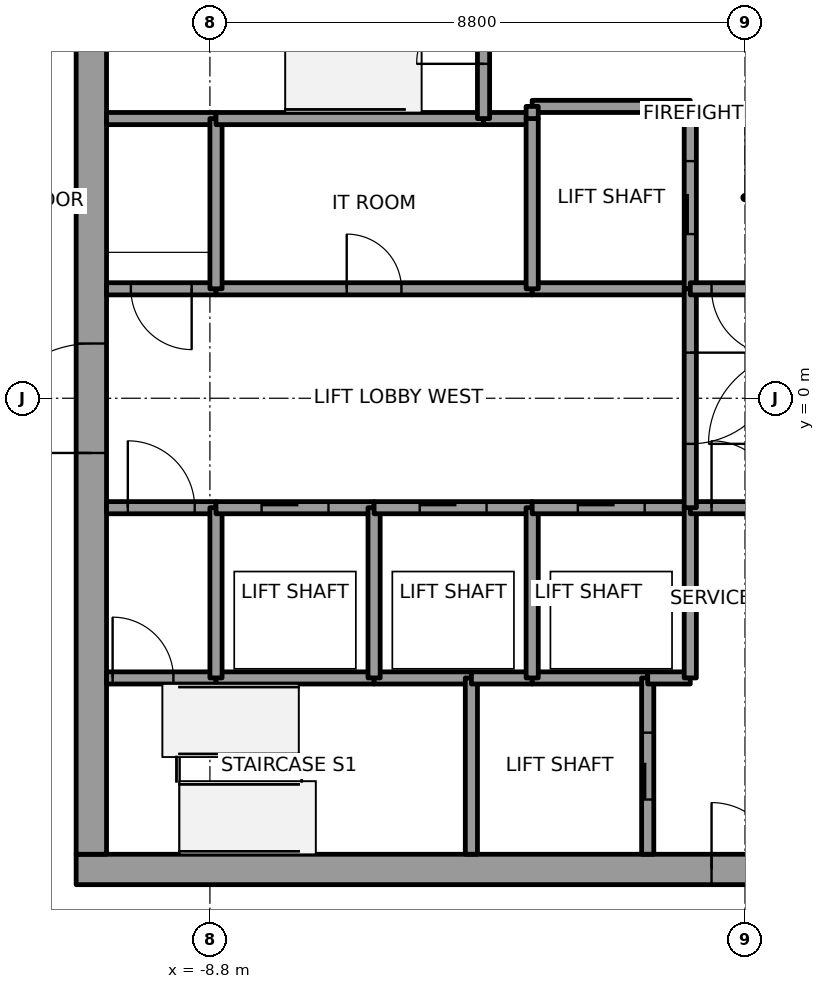
"""IFC4 building model, lengths in metres.
Left out: names, types, materials, properties, quantities, classifications, styles, units other than length and angle.
Written with IfcOpenShell. Run it as: python <this file> out.ifc"""

import sys

from ifc_helpers import new_model, si_unit, direction, frame, frame_2d, origin, place, context, subcontext, project, spatial, rectangle, extrude, element, fill, save


model = new_model("IFC4")
c1 = context("Model", 3, precision=1e-05, world=origin(), true_north=direction((0.0, 1.0)))
c2 = subcontext(c1, "Body", "Model", "MODEL_VIEW")
j1 = project(units=[si_unit("LENGTHUNIT", "METRE"), si_unit("PLANEANGLEUNIT", "RADIAN")], contexts=[c1])
p1 = place(None, origin())
s1 = spatial("IfcSite", under=j1, at=p1, CompositionType="ELEMENT")
p2 = place(p1, origin())
s2 = spatial("IfcBuilding", under=s1, at=p2, CompositionType="ELEMENT")
p3 = place(p2, frame((0.0, 0.0, 319.0)))
s3 = spatial("IfcBuildingStorey", under=s2, at=p3, CompositionType="ELEMENT", Elevation=319.0)
p4 = place(p3, frame((-11.0, -7.75, 0.0), z_axis=(0.0, 0.0, 1.0), x_axis=(1.0, 0.0, 0.0)))
e1 = element("IfcWall", 1, at=p4, inside=s3, PredefinedType="SHEAR", context=c2, shape_type="SweptSolid", body=[
    extrude(rectangle(XDim=22.0, YDim=0.5, at=frame_2d((11.0, 0.0))), origin(), (0.0, 0.0, 1.0), 5.4),
])
p5 = place(p4, frame((10.45, 0.0, 0.0)))
e2 = element("IfcOpeningElement", 2, at=p5, cuts=e1, PredefinedType="OPENING", context=c2, shape_type="SweptSolid", body=[
    extrude(rectangle(XDim=1.1, YDim=2.1, at=frame_2d((0.55, 1.05))), frame((0.0, 0.25, 0.0), z_axis=(0.0, -1.0, 0.0), x_axis=(1.0, 0.0, 0.0)), (0.0, 0.0, 1.0), 0.5),
])
p6 = place(p3, frame((-10.75, -7.5, 0.0), z_axis=(0.0, 0.0, 1.0), x_axis=(0.0, 1.0, 0.0)))
e3 = element("IfcWall", 3, at=p6, inside=s3, PredefinedType="SHEAR", context=c2, shape_type="SweptSolid", body=[
    extrude(rectangle(XDim=15.0, YDim=0.5, at=frame_2d((7.5, 0.0))), origin(), (0.0, 0.0, 1.0), 5.4),
])
p7 = place(p6, frame((6.6, 0.0, 0.0)))
e4 = element("IfcOpeningElement", 4, at=p7, cuts=e3, PredefinedType="OPENING", context=c2, shape_type="SweptSolid", body=[
    extrude(rectangle(XDim=1.8, YDim=2.1, at=frame_2d((0.9, 1.05))), frame((0.0, 0.25, 0.0), z_axis=(0.0, -1.0, 0.0), x_axis=(1.0, 0.0, 0.0)), (0.0, 0.0, 1.0), 0.5),
])
p8 = place(p3, frame((-10.5, -4.6, 0.0), z_axis=(0.0, 0.0, 1.0), x_axis=(1.0, 0.0, 0.0)))
e5 = element("IfcWall", 5, at=p8, inside=s3, PredefinedType="SOLIDWALL", context=c2, shape_type="SweptSolid", body=[
    extrude(rectangle(XDim=1.8, YDim=0.2, at=frame_2d((0.9, 0.0))), origin(), (0.0, 0.0, 1.0), 5.25),
])
p9 = place(p8, frame((0.1, 0.0, 0.0)))
e6 = element("IfcOpeningElement", 6, at=p9, cuts=e5, PredefinedType="OPENING", context=c2, shape_type="SweptSolid", body=[
    extrude(rectangle(XDim=1.0, YDim=2.1, at=frame_2d((0.5, 1.05))), frame((0.0, 0.1, 0.0), z_axis=(0.0, -1.0, 0.0), x_axis=(1.0, 0.0, 0.0)), (0.0, 0.0, 1.0), 0.2),
])
p10 = place(p3, frame((-10.5, -1.8, 0.0), z_axis=(0.0, 0.0, 1.0), x_axis=(1.0, 0.0, 0.0)))
e7 = element("IfcWall", 7, at=p10, inside=s3, PredefinedType="SOLIDWALL", context=c2, shape_type="SweptSolid", body=[
    extrude(rectangle(XDim=1.8, YDim=0.2, at=frame_2d((0.9, 0.0))), origin(), (0.0, 0.0, 1.0), 5.25),
])
p11 = place(p10, frame((0.35, 0.0, 0.0)))
e8 = element("IfcOpeningElement", 8, at=p11, cuts=e7, PredefinedType="OPENING", context=c2, shape_type="SweptSolid", body=[
    extrude(rectangle(XDim=1.1, YDim=2.1, at=frame_2d((0.55, 1.05))), frame((0.0, 0.1, 0.0), z_axis=(0.0, -1.0, 0.0), x_axis=(1.0, 0.0, 0.0)), (0.0, 0.0, 1.0), 0.2),
])
p12 = place(p3, frame((-8.7, 1.8, 0.0), z_axis=(0.0, 0.0, 1.0), x_axis=(-1.0, 0.0, 0.0)))
e9 = element("IfcWall", 9, at=p12, inside=s3, PredefinedType="SOLIDWALL", context=c2, shape_type="SweptSolid", body=[
    extrude(rectangle(XDim=1.8, YDim=0.2, at=frame_2d((0.9, 0.0))), origin(), (0.0, 0.0, 1.0), 5.25),
])
p13 = place(p12, frame((0.4, 0.0, 0.0)))
e10 = element("IfcOpeningElement", 10, at=p13, cuts=e9, PredefinedType="OPENING", context=c2, shape_type="SweptSolid", body=[
    extrude(rectangle(XDim=1.0, YDim=2.1, at=frame_2d((0.5, 1.05))), frame((0.0, 0.1, 0.0), z_axis=(0.0, -1.0, 0.0), x_axis=(1.0, 0.0, 0.0)), (0.0, 0.0, 1.0), 0.2),
])
p14 = place(p3, frame((-8.7, 4.6, 0.0), z_axis=(0.0, 0.0, 1.0), x_axis=(-1.0, 0.0, 0.0)))
e11 = element("IfcWall", 11, at=p14, inside=s3, PredefinedType="SOLIDWALL", context=c2, shape_type="SweptSolid", body=[
    extrude(rectangle(XDim=1.8, YDim=0.2, at=frame_2d((0.9, 0.0))), origin(), (0.0, 0.0, 1.0), 5.25),
])
p15 = place(p3, frame((-8.7, -4.6, 0.0), z_axis=(0.0, 0.0, 1.0), x_axis=(1.0, 0.0, 0.0)))
e12 = element("IfcWall", 12, at=p15, inside=s3, PredefinedType="SOLIDWALL", context=c2, shape_type="SweptSolid", body=[
    extrude(rectangle(XDim=2.6, YDim=0.2, at=frame_2d((1.3, 0.0))), origin(), (0.0, 0.0, 1.0), 5.25),
])
p16 = place(p3, frame((-8.7, -4.6, 0.0), z_axis=(0.0, 0.0, 1.0), x_axis=(0.0, 1.0, 0.0)))
e13 = element("IfcWall", 13, at=p16, inside=s3, PredefinedType="SOLIDWALL", context=c2, shape_type="SweptSolid", body=[
    extrude(rectangle(XDim=2.8, YDim=0.2, at=frame_2d((1.4, 0.0))), origin(), (0.0, 0.0, 1.0), 5.25),
])
p17 = place(p3, frame((-8.7, -1.8, 0.0), z_axis=(0.0, 0.0, 1.0), x_axis=(1.0, 0.0, 0.0)))
e14 = element("IfcWall", 14, at=p17, inside=s3, PredefinedType="SOLIDWALL", context=c2, shape_type="SweptSolid", body=[
    extrude(rectangle(XDim=2.6, YDim=0.2, at=frame_2d((1.3, 0.0))), origin(), (0.0, 0.0, 1.0), 5.25),
])
p18 = place(p17, frame((0.75, 0.0, 0.0)))
e15 = element("IfcOpeningElement", 15, at=p18, cuts=e14, PredefinedType="OPENING", context=c2, shape_type="SweptSolid", body=[
    extrude(rectangle(XDim=1.1, YDim=2.1, at=frame_2d((0.55, 1.05))), frame((0.0, 0.1, 0.0), z_axis=(0.0, -1.0, 0.0), x_axis=(1.0, 0.0, 0.0)), (0.0, 0.0, 1.0), 0.2),
])
p19 = place(p3, frame((-8.7, 1.8, 0.0), z_axis=(0.0, 0.0, 1.0), x_axis=(1.0, 0.0, 0.0)))
e16 = element("IfcWall", 16, at=p19, inside=s3, PredefinedType="SOLIDWALL", context=c2, shape_type="SweptSolid", body=[
    extrude(rectangle(XDim=5.2, YDim=0.2, at=frame_2d((2.6, 0.0))), origin(), (0.0, 0.0, 1.0), 5.25),
])
p20 = place(p19, frame((2.15, 0.0, 0.0)))
e17 = element("IfcOpeningElement", 17, at=p20, cuts=e16, PredefinedType="OPENING", context=c2, shape_type="SweptSolid", body=[
    extrude(rectangle(XDim=0.9, YDim=2.1, at=frame_2d((0.45, 1.05))), frame((0.0, 0.1, 0.0), z_axis=(0.0, -1.0, 0.0), x_axis=(1.0, 0.0, 0.0)), (0.0, 0.0, 1.0), 0.2),
])
p21 = place(p3, frame((-8.7, 4.6, 0.0), z_axis=(0.0, 0.0, 1.0), x_axis=(0.0, -1.0, 0.0)))
e18 = element("IfcWall", 18, at=p21, inside=s3, PredefinedType="SOLIDWALL", context=c2, shape_type="SweptSolid", body=[
    extrude(rectangle(XDim=2.8, YDim=0.2, at=frame_2d((1.4, 0.0))), origin(), (0.0, 0.0, 1.0), 5.25),
])
p22 = place(p3, frame((-4.3, 4.6, 0.0), z_axis=(0.0, 0.0, 1.0), x_axis=(-1.0, 0.0, 0.0)))
e19 = element("IfcWall", 19, at=p22, inside=s3, PredefinedType="SOLIDWALL", context=c2, shape_type="SweptSolid", body=[
    extrude(rectangle(XDim=4.4, YDim=0.2, at=frame_2d((2.2, 0.0))), origin(), (0.0, 0.0, 1.0), 5.25),
])
p23 = place(p3, frame((-6.1, -4.6, 0.0), z_axis=(0.0, 0.0, 1.0), x_axis=(1.0, 0.0, 0.0)))
e20 = element("IfcWall", 20, at=p23, inside=s3, PredefinedType="SOLIDWALL", context=c2, shape_type="SweptSolid", body=[
    extrude(rectangle(XDim=1.6, YDim=0.2, at=frame_2d((0.8, 0.0))), origin(), (0.0, 0.0, 1.0), 5.25),
])
p24 = place(p3, frame((-6.1, -4.6, 0.0), z_axis=(0.0, 0.0, 1.0), x_axis=(0.0, 1.0, 0.0)))
e21 = element("IfcWall", 21, at=p24, inside=s3, PredefinedType="SOLIDWALL", context=c2, shape_type="SweptSolid", body=[
    extrude(rectangle(XDim=2.8, YDim=0.2, at=frame_2d((1.4, 0.0))), origin(), (0.0, 0.0, 1.0), 5.25),
])
p25 = place(p3, frame((-6.1, -1.8, 0.0), z_axis=(0.0, 0.0, 1.0), x_axis=(1.0, 0.0, 0.0)))
e22 = element("IfcWall", 22, at=p25, inside=s3, PredefinedType="SOLIDWALL", context=c2, shape_type="SweptSolid", body=[
    extrude(rectangle(XDim=2.6, YDim=0.2, at=frame_2d((1.3, 0.0))), origin(), (0.0, 0.0, 1.0), 5.25),
])
p26 = place(p25, frame((0.75, 0.0, 0.0)))
e23 = element("IfcOpeningElement", 23, at=p26, cuts=e22, PredefinedType="OPENING", context=c2, shape_type="SweptSolid", body=[
    extrude(rectangle(XDim=1.1, YDim=2.1, at=frame_2d((0.55, 1.05))), frame((0.0, 0.1, 0.0), z_axis=(0.0, -1.0, 0.0), x_axis=(1.0, 0.0, 0.0)), (0.0, 0.0, 1.0), 0.2),
])
p27 = place(p3, frame((-4.5, -4.6, 0.0), z_axis=(0.0, 0.0, 1.0), x_axis=(0.0, -1.0, 0.0)))
e24 = element("IfcWall", 24, at=p27, inside=s3, PredefinedType="SOLIDWALL", context=c2, shape_type="SweptSolid", body=[
    extrude(rectangle(XDim=2.9, YDim=0.2, at=frame_2d((1.45, 0.0))), origin(), (0.0, 0.0, 1.0), 5.25),
])
p28 = place(p3, frame((-4.5, -4.6, 0.0), z_axis=(0.0, 0.0, 1.0), x_axis=(1.0, 0.0, 0.0)))
e25 = element("IfcWall", 25, at=p28, inside=s3, PredefinedType="SOLIDWALL", context=c2, shape_type="SweptSolid", body=[
    extrude(rectangle(XDim=1.0, YDim=0.2, at=frame_2d((0.5, 0.0))), origin(), (0.0, 0.0, 1.0), 5.25),
])
p29 = place(p3, frame((-3.5, 4.6, 0.0), z_axis=(0.0, 0.0, 1.0), x_axis=(-1.0, 0.0, 0.0)))
e26 = element("IfcWall", 26, at=p29, inside=s3, PredefinedType="SOLIDWALL", context=c2, shape_type="SweptSolid", body=[
    extrude(rectangle(XDim=0.8, YDim=0.2, at=frame_2d((0.4, 0.0))), origin(), (0.0, 0.0, 1.0), 5.25),
])
p30 = place(p3, frame((-4.3, 4.6, 0.0), z_axis=(0.0, 0.0, 1.0), x_axis=(0.0, 1.0, 0.0)))
e27 = element("IfcWall", 27, at=p30, inside=s3, PredefinedType="SOLIDWALL", context=c2, shape_type="SweptSolid", body=[
    extrude(rectangle(XDim=2.9, YDim=0.2, at=frame_2d((1.45, 0.0))), origin(), (0.0, 0.0, 1.0), 5.25),
])
p31 = place(p30, frame((0.9, 0.0, 0.0)))
e28 = element("IfcOpeningElement", 28, at=p31, cuts=e27, PredefinedType="OPENING", context=c2, shape_type="SweptSolid", body=[
    extrude(rectangle(XDim=1.1, YDim=2.1, at=frame_2d((0.55, 1.05))), frame((0.0, 0.1, 0.0), z_axis=(0.0, -1.0, 0.0), x_axis=(1.0, 0.0, 0.0)), (0.0, 0.0, 1.0), 0.2),
])
p32 = place(p3, frame((-3.5, -4.6, 0.0), z_axis=(0.0, 0.0, 1.0), x_axis=(1.0, 0.0, 0.0)))
e29 = element("IfcWall", 29, at=p32, inside=s3, PredefinedType="SOLIDWALL", context=c2, shape_type="SweptSolid", body=[
    extrude(rectangle(XDim=1.9, YDim=0.2, at=frame_2d((0.95, 0.0))), origin(), (0.0, 0.0, 1.0), 5.25),
])
p33 = place(p3, frame((-3.5, -4.6, 0.0), z_axis=(0.0, 0.0, 1.0), x_axis=(0.0, 1.0, 0.0)))
e30 = element("IfcWall", 30, at=p33, inside=s3, PredefinedType="SOLIDWALL", context=c2, shape_type="SweptSolid", body=[
    extrude(rectangle(XDim=2.8, YDim=0.2, at=frame_2d((1.4, 0.0))), origin(), (0.0, 0.0, 1.0), 5.25),
])
p34 = place(p3, frame((-3.5, -1.8, 0.0), z_axis=(0.0, 0.0, 1.0), x_axis=(1.0, 0.0, 0.0)))
e31 = element("IfcWall", 31, at=p34, inside=s3, PredefinedType="SOLIDWALL", context=c2, shape_type="SweptSolid", body=[
    extrude(rectangle(XDim=2.6, YDim=0.2, at=frame_2d((1.3, 0.0))), origin(), (0.0, 0.0, 1.0), 5.25),
])
p35 = place(p34, frame((0.75, 0.0, 0.0)))
e32 = element("IfcOpeningElement", 32, at=p35, cuts=e31, PredefinedType="OPENING", context=c2, shape_type="SweptSolid", body=[
    extrude(rectangle(XDim=1.1, YDim=2.1, at=frame_2d((0.55, 1.05))), frame((0.0, 0.1, 0.0), z_axis=(0.0, -1.0, 0.0), x_axis=(1.0, 0.0, 0.0)), (0.0, 0.0, 1.0), 0.2),
])
p36 = place(p3, frame((-0.9, 1.8, 0.0), z_axis=(0.0, 0.0, 1.0), x_axis=(-1.0, 0.0, 0.0)))
e33 = element("IfcWall", 33, at=p36, inside=s3, PredefinedType="SOLIDWALL", context=c2, shape_type="SweptSolid", body=[
    extrude(rectangle(XDim=2.6, YDim=0.2, at=frame_2d((1.3, 0.0))), origin(), (0.0, 0.0, 1.0), 5.25),
])
p37 = place(p3, frame((-3.5, 1.8, 0.0), z_axis=(0.0, 0.0, 1.0), x_axis=(0.0, 1.0, 0.0)))
e34 = element("IfcWall", 34, at=p37, inside=s3, PredefinedType="SOLIDWALL", context=c2, shape_type="SweptSolid", body=[
    extrude(rectangle(XDim=2.8, YDim=0.2, at=frame_2d((1.4, 0.0))), origin(), (0.0, 0.0, 1.0), 5.25),
])
p38 = place(p3, frame((-0.9, 1.8, 0.0), z_axis=(0.0, 0.0, 1.0), x_axis=(0.0, 1.0, 0.0)))
e35 = element("IfcWall", 35, at=p38, inside=s3, PredefinedType="SOLIDWALL", context=c2, shape_type="SweptSolid", body=[
    extrude(rectangle(XDim=3.0, YDim=0.2, at=frame_2d((1.5, 0.0))), origin(), (0.0, 0.0, 1.0), 5.25),
])
p39 = place(p38, frame((0.9, 0.0, 0.0)))
e36 = element("IfcOpeningElement", 36, at=p39, cuts=e35, PredefinedType="OPENING", context=c2, shape_type="SweptSolid", body=[
    extrude(rectangle(XDim=1.2, YDim=2.1, at=frame_2d((0.6, 1.05))), frame((0.0, 0.1, 0.0), z_axis=(0.0, -1.0, 0.0), x_axis=(1.0, 0.0, 0.0)), (0.0, 0.0, 1.0), 0.2),
])
p40 = place(p3, frame((-0.9, 4.8, 0.0), z_axis=(0.0, 0.0, 1.0), x_axis=(-1.0, 0.0, 0.0)))
e37 = element("IfcWall", 37, at=p40, inside=s3, PredefinedType="SOLIDWALL", context=c2, shape_type="SweptSolid", body=[
    extrude(rectangle(XDim=2.6, YDim=0.2, at=frame_2d((1.3, 0.0))), origin(), (0.0, 0.0, 1.0), 5.25),
])
p41 = place(p3, frame((-3.5, 4.8, 0.0), z_axis=(0.0, 0.0, 1.0), x_axis=(0.0, -1.0, 0.0)))
e38 = element("IfcWall", 38, at=p41, inside=s3, PredefinedType="SOLIDWALL", context=c2, shape_type="SweptSolid", body=[
    extrude(rectangle(XDim=0.2, YDim=0.2, at=frame_2d((0.1, 0.0))), origin(), (0.0, 0.0, 1.0), 5.25),
])
p42 = place(p3, frame((-1.6, -7.5, 0.0), z_axis=(0.0, 0.0, 1.0), x_axis=(0.0, 1.0, 0.0)))
e39 = element("IfcWall", 39, at=p42, inside=s3, PredefinedType="SOLIDWALL", context=c2, shape_type="SweptSolid", body=[
    extrude(rectangle(XDim=2.9, YDim=0.2, at=frame_2d((1.45, 0.0))), origin(), (0.0, 0.0, 1.0), 5.25),
])
p43 = place(p42, frame((0.9, 0.0, 0.0)))
e40 = element("IfcOpeningElement", 40, at=p43, cuts=e39, PredefinedType="OPENING", context=c2, shape_type="SweptSolid", body=[
    extrude(rectangle(XDim=1.1, YDim=2.1, at=frame_2d((0.55, 1.05))), frame((0.0, 0.1, 0.0), z_axis=(0.0, -1.0, 0.0), x_axis=(1.0, 0.0, 0.0)), (0.0, 0.0, 1.0), 0.2),
])
p44 = place(p3, frame((-1.6, -4.6, 0.0), z_axis=(0.0, 0.0, 1.0), x_axis=(1.0, 0.0, 0.0)))
e41 = element("IfcWall", 41, at=p44, inside=s3, PredefinedType="SOLIDWALL", context=c2, shape_type="SweptSolid", body=[
    extrude(rectangle(XDim=0.7, YDim=0.2, at=frame_2d((0.35, 0.0))), origin(), (0.0, 0.0, 1.0), 5.25),
])
p45 = place(p3, frame((-0.9, -4.6, 0.0), z_axis=(0.0, 0.0, 1.0), x_axis=(0.0, 1.0, 0.0)))
e42 = element("IfcWall", 42, at=p45, inside=s3, PredefinedType="SOLIDWALL", context=c2, shape_type="SweptSolid", body=[
    extrude(rectangle(XDim=2.8, YDim=0.2, at=frame_2d((1.4, 0.0))), origin(), (0.0, 0.0, 1.0), 5.25),
])
p46 = place(p3, frame((-0.9, -1.8, 0.0), z_axis=(0.0, 0.0, 1.0), x_axis=(1.0, 0.0, 0.0)))
e43 = element("IfcWall", 43, at=p46, inside=s3, PredefinedType="SOLIDWALL", context=c2, shape_type="SweptSolid", body=[
    extrude(rectangle(XDim=1.8, YDim=0.2, at=frame_2d((0.9, 0.0))), origin(), (0.0, 0.0, 1.0), 5.25),
])
p47 = place(p46, frame((0.35, 0.0, 0.0)))
e44 = element("IfcOpeningElement", 44, at=p47, cuts=e43, PredefinedType="OPENING", context=c2, shape_type="SweptSolid", body=[
    extrude(rectangle(XDim=1.1, YDim=2.1, at=frame_2d((0.55, 1.05))), frame((0.0, 0.1, 0.0), z_axis=(0.0, -1.0, 0.0), x_axis=(1.0, 0.0, 0.0)), (0.0, 0.0, 1.0), 0.2),
])
p48 = place(p3, frame((-0.9, 1.8, 0.0), z_axis=(0.0, 0.0, 1.0), x_axis=(0.0, -1.0, 0.0)))
e45 = element("IfcWall", 45, at=p48, inside=s3, PredefinedType="SOLIDWALL", context=c2, shape_type="SweptSolid", body=[
    extrude(rectangle(XDim=3.6, YDim=0.2, at=frame_2d((1.8, 0.0))), origin(), (0.0, 0.0, 1.0), 5.25),
])
p49 = place(p48, frame((1.05, 0.0, 0.0)))
e46 = element("IfcOpeningElement", 46, at=p49, cuts=e45, PredefinedType="OPENING", context=c2, shape_type="SweptSolid", body=[
    extrude(rectangle(XDim=1.5, YDim=2.1, at=frame_2d((0.75, 1.05))), frame((0.0, 0.1, 0.0), z_axis=(0.0, -1.0, 0.0), x_axis=(1.0, 0.0, 0.0)), (0.0, 0.0, 1.0), 0.2),
])
p50 = place(p3, frame((0.9, 1.8, 0.0), z_axis=(0.0, 0.0, 1.0), x_axis=(-1.0, 0.0, 0.0)))
e47 = element("IfcWall", 47, at=p50, inside=s3, PredefinedType="SOLIDWALL", context=c2, shape_type="SweptSolid", body=[
    extrude(rectangle(XDim=1.8, YDim=0.2, at=frame_2d((0.9, 0.0))), origin(), (0.0, 0.0, 1.0), 5.25),
])
p51 = place(p50, frame((0.35, 0.0, 0.0)))
e48 = element("IfcOpeningElement", 48, at=p51, cuts=e47, PredefinedType="OPENING", context=c2, shape_type="SweptSolid", body=[
    extrude(rectangle(XDim=1.1, YDim=2.1, at=frame_2d((0.55, 1.05))), frame((0.0, 0.1, 0.0), z_axis=(0.0, -1.0, 0.0), x_axis=(1.0, 0.0, 0.0)), (0.0, 0.0, 1.0), 0.2),
])
p52 = place(p18, origin())
e49 = element("IfcDoor", 49, at=p52, inside=s3, OperationType="SLIDING_TO_LEFT", PredefinedType="DOOR", context=c2, shape_type="SweptSolid", body=[
    extrude(rectangle(XDim=1.1, YDim=2.1, at=frame_2d((0.55, 1.05))), frame((0.0, 0.025, 0.0), z_axis=(0.0, -1.0, 0.0), x_axis=(1.0, 0.0, 0.0)), (0.0, 0.0, 1.0), 0.05),
])
fill(e15, e49)
p53 = place(p26, origin())
e50 = element("IfcDoor", 50, at=p53, inside=s3, OperationType="SLIDING_TO_RIGHT", PredefinedType="DOOR", context=c2, shape_type="SweptSolid", body=[
    extrude(rectangle(XDim=1.1, YDim=2.1, at=frame_2d((0.55, 1.05))), frame((0.0, 0.025, 0.0), z_axis=(0.0, -1.0, 0.0), x_axis=(1.0, 0.0, 0.0)), (0.0, 0.0, 1.0), 0.05),
])
fill(e23, e50)
p54 = place(p35, origin())
e51 = element("IfcDoor", 51, at=p54, inside=s3, OperationType="SLIDING_TO_LEFT", PredefinedType="DOOR", context=c2, shape_type="SweptSolid", body=[
    extrude(rectangle(XDim=1.1, YDim=2.1, at=frame_2d((0.55, 1.05))), frame((0.0, 0.025, 0.0), z_axis=(0.0, -1.0, 0.0), x_axis=(1.0, 0.0, 0.0)), (0.0, 0.0, 1.0), 0.05),
])
fill(e32, e51)
p55 = place(p39, origin())
e52 = element("IfcDoor", 52, at=p55, inside=s3, OperationType="SLIDING_TO_RIGHT", PredefinedType="DOOR", context=c2, shape_type="SweptSolid", body=[
    extrude(rectangle(XDim=1.2, YDim=2.1, at=frame_2d((0.6, 1.05))), frame((0.0, 0.025, 0.0), z_axis=(0.0, -1.0, 0.0), x_axis=(1.0, 0.0, 0.0)), (0.0, 0.0, 1.0), 0.05),
])
fill(e36, e52)
p56 = place(p43, origin())
e53 = element("IfcDoor", 53, at=p56, inside=s3, OperationType="SLIDING_TO_LEFT", PredefinedType="DOOR", context=c2, shape_type="SweptSolid", body=[
    extrude(rectangle(XDim=1.1, YDim=2.1, at=frame_2d((0.55, 1.05))), frame((0.0, 0.025, 0.0), z_axis=(0.0, -1.0, 0.0), x_axis=(1.0, 0.0, 0.0)), (0.0, 0.0, 1.0), 0.05),
])
fill(e40, e53)
p57 = place(p49, origin())
e54 = element("IfcDoor", 54, at=p57, inside=s3, OperationType="DOUBLE_DOOR_SINGLE_SWING", PredefinedType="DOOR", context=c2, shape_type="SweptSolid", body=[
    extrude(rectangle(XDim=1.5, YDim=2.1, at=frame_2d((0.75, 1.05))), frame((0.0, 0.025, 0.0), z_axis=(0.0, -1.0, 0.0), x_axis=(1.0, 0.0, 0.0)), (0.0, 0.0, 1.0), 0.05),
])
fill(e46, e54)
p58 = place(p11, origin())
e55 = element("IfcDoor", 55, at=p58, inside=s3, OperationType="SINGLE_SWING_RIGHT", PredefinedType="DOOR", context=c2, shape_type="SweptSolid", body=[
    extrude(rectangle(XDim=1.1, YDim=2.1, at=frame_2d((0.55, 1.05))), frame((0.0, 0.025, 0.0), z_axis=(0.0, -1.0, 0.0), x_axis=(1.0, 0.0, 0.0)), (0.0, 0.0, 1.0), 0.05),
])
fill(e8, e55)
p59 = place(p51, origin())
e56 = element("IfcDoor", 56, at=p59, inside=s3, OperationType="SINGLE_SWING_RIGHT", PredefinedType="DOOR", context=c2, shape_type="SweptSolid", body=[
    extrude(rectangle(XDim=1.1, YDim=2.1, at=frame_2d((0.55, 1.05))), frame((0.0, 0.025, 0.0), z_axis=(0.0, -1.0, 0.0), x_axis=(1.0, 0.0, 0.0)), (0.0, 0.0, 1.0), 0.05),
])
fill(e48, e56)
p60 = place(p47, origin())
e57 = element("IfcDoor", 57, at=p60, inside=s3, OperationType="SINGLE_SWING_LEFT", PredefinedType="DOOR", context=c2, shape_type="SweptSolid", body=[
    extrude(rectangle(XDim=1.1, YDim=2.1, at=frame_2d((0.55, 1.05))), frame((0.0, 0.025, 0.0), z_axis=(0.0, -1.0, 0.0), x_axis=(1.0, 0.0, 0.0)), (0.0, 0.0, 1.0), 0.05),
])
fill(e44, e57)
p61 = place(p13, origin())
e58 = element("IfcDoor", 58, at=p61, inside=s3, OperationType="SINGLE_SWING_RIGHT", PredefinedType="DOOR", context=c2, shape_type="SweptSolid", body=[
    extrude(rectangle(XDim=1.0, YDim=2.1, at=frame_2d((0.5, 1.05))), frame((0.0, 0.025, 0.0), z_axis=(0.0, -1.0, 0.0), x_axis=(1.0, 0.0, 0.0)), (0.0, 0.0, 1.0), 0.05),
])
fill(e10, e58)
p62 = place(p9, origin())
e59 = element("IfcDoor", 59, at=p62, inside=s3, OperationType="SINGLE_SWING_LEFT", PredefinedType="DOOR", context=c2, shape_type="SweptSolid", body=[
    extrude(rectangle(XDim=1.0, YDim=2.1, at=frame_2d((0.5, 1.05))), frame((0.0, 0.025, 0.0), z_axis=(0.0, -1.0, 0.0), x_axis=(1.0, 0.0, 0.0)), (0.0, 0.0, 1.0), 0.05),
])
fill(e6, e59)
p63 = place(p31, origin())
e60 = element("IfcDoor", 60, at=p63, inside=s3, OperationType="SINGLE_SWING_RIGHT", PredefinedType="DOOR", context=c2, shape_type="SweptSolid", body=[
    extrude(rectangle(XDim=1.1, YDim=2.1, at=frame_2d((0.55, 1.05))), frame((0.0, 0.025, 0.0), z_axis=(0.0, -1.0, 0.0), x_axis=(1.0, 0.0, 0.0)), (0.0, 0.0, 1.0), 0.05),
])
fill(e28, e60)
p64 = place(p20, origin())
e61 = element("IfcDoor", 61, at=p64, inside=s3, OperationType="SINGLE_SWING_RIGHT", PredefinedType="DOOR", context=c2, shape_type="SweptSolid", body=[
    extrude(rectangle(XDim=0.9, YDim=2.1, at=frame_2d((0.45, 1.05))), frame((0.0, 0.025, 0.0), z_axis=(0.0, -1.0, 0.0), x_axis=(1.0, 0.0, 0.0)), (0.0, 0.0, 1.0), 0.05),
])
fill(e17, e61)
p65 = place(p7, origin())
e62 = element("IfcDoor", 62, at=p65, inside=s3, OperationType="DOUBLE_DOOR_SINGLE_SWING", PredefinedType="DOOR", context=c2, shape_type="SweptSolid", body=[
    extrude(rectangle(XDim=1.8, YDim=2.1, at=frame_2d((0.9, 1.05))), frame((0.0, 0.025, 0.0), z_axis=(0.0, -1.0, 0.0), x_axis=(1.0, 0.0, 0.0)), (0.0, 0.0, 1.0), 0.05),
])
fill(e4, e62)
p66 = place(p5, origin())
e63 = element("IfcDoor", 63, at=p66, inside=s3, OperationType="SINGLE_SWING_RIGHT", PredefinedType="DOOR", context=c2, shape_type="SweptSolid", body=[
    extrude(rectangle(XDim=1.1, YDim=2.1, at=frame_2d((0.55, 1.05))), frame((0.0, 0.025, 0.0), z_axis=(0.0, -1.0, 0.0), x_axis=(1.0, 0.0, 0.0)), (0.0, 0.0, 1.0), 0.05),
])
fill(e2, e63)
save(model, sys.argv[1])
